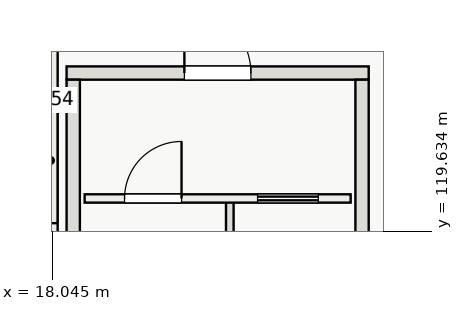
"""IFC4 building model, lengths in metres.
Left out: names, types, materials, properties, quantities, classifications, styles, units other than length and angle.
Written with IfcOpenShell. Run it as: python <this file> out.ifc"""

import sys

from ifc_helpers import new_model, si_unit, direction, frame, frame_2d, origin, place, context, subcontext, project, spatial, rectangle, extrude, element, fill, save


model = new_model("IFC4")
c1 = context("Model", 3, precision=1e-05, world=origin(), true_north=direction((0.0, 1.0)))
c2 = subcontext(c1, "Body", "Model", "MODEL_VIEW")
j1 = project(units=[si_unit("LENGTHUNIT", "METRE"), si_unit("PLANEANGLEUNIT", "RADIAN")], contexts=[c1])
p1 = place(None, origin())
s1 = spatial("IfcSite", under=j1, at=p1, CompositionType="ELEMENT")
p2 = place(p1, origin())
s2 = spatial("IfcBuilding", under=s1, at=p2, CompositionType="ELEMENT")
p3 = place(p2, origin())
s3 = spatial("IfcBuildingStorey", under=s2, at=p3, CompositionType="ELEMENT", Elevation=0.0)
p4 = place(p3, frame((18.425, 123.8, 0.0), z_axis=(0.0, 0.0, 1.0), x_axis=(1.0, 0.0, 0.0)))
e1 = element("IfcWall", 1, at=p4, inside=s3, PredefinedType="SHEAR", context=c2, shape_type="SweptSolid", body=[
    extrude(rectangle(XDim=7.95, YDim=0.35, at=frame_2d((3.975, 0.0))), origin(), (0.0, 0.0, 1.0), 6.0),
])
p5 = place(p4, frame((3.1, 0.0, 0.0)))
e2 = element("IfcOpeningElement", 2, at=p5, cuts=e1, PredefinedType="OPENING", context=c2, shape_type="SweptSolid", body=[
    extrude(rectangle(XDim=1.75, YDim=2.3, at=frame_2d((0.875, 1.15))), frame((0.0, 0.185, 0.0), z_axis=(0.0, -1.0, 0.0), x_axis=(1.0, 0.0, 0.0)), (0.0, 0.0, 1.0), 0.37),
])
for number, where, z_axis, x_axis in (
    (3, (18.6, 112.375, 0.0), (0.0, 0.0, 1.0), (0.0, 1.0, 0.0)),
    (4, (26.2, 112.375, 0.0), (0.0, 0.0, 1.0), (0.0, 1.0, 0.0)),
):
    element("IfcWall", number, at=place(p3, frame(where, z_axis=z_axis, x_axis=x_axis)), inside=s3, PredefinedType="SHEAR", context=c2, shape_type="SweptSolid", body=[
        extrude(rectangle(XDim=11.25, YDim=0.35, at=frame_2d((5.625, 0.0))), origin(), (0.0, 0.0, 1.0), 6.0),
    ])
p6 = place(p3, frame((18.0, 125.551, 0.0), z_axis=(0.0, 0.0, 1.0), x_axis=(0.0, -1.0, 0.0)))
e5 = element("IfcWall", 5, at=p6, inside=s3, PredefinedType="SOLIDWALL", context=c2, shape_type="SweptSolid", body=[
    extrude(rectangle(XDim=8.101, YDim=0.38, at=frame_2d((4.051, 0.0))), origin(), (0.0, 0.0, 1.0), 4.72),
])
p7 = place(p6, frame((2.4, 0.0, 1.0)))
e6 = element("IfcOpeningElement", 6, at=p7, cuts=e5, PredefinedType="OPENING", context=c2, shape_type="SweptSolid", body=[
    extrude(rectangle(XDim=3.3, YDim=1.9, at=frame_2d((1.65, 0.95))), frame((0.0, 0.2, 0.0), z_axis=(0.0, -1.0, 0.0), x_axis=(1.0, 0.0, 0.0)), (0.0, 0.0, 1.0), 0.4),
])
p8 = place(p3, frame((22.72, 112.45, 0.0), z_axis=(0.0, 0.0, 1.0), x_axis=(0.0, 1.0, 0.0)))
e7 = element("IfcWall", 7, at=p8, inside=s3, PredefinedType="SOLIDWALL", context=c2, shape_type="SweptSolid", body=[
    extrude(rectangle(XDim=8.0, YDim=0.2, at=frame_2d((4.0, 0.0))), origin(), (0.0, 0.0, 1.0), 6.0),
])
p9 = place(p3, frame((18.9, 120.5, 0.0), z_axis=(0.0, 0.0, 1.0), x_axis=(1.0, 0.0, 0.0)))
e8 = element("IfcWall", 8, at=p9, inside=s3, PredefinedType="SOLIDWALL", context=c2, shape_type="SweptSolid", body=[
    extrude(rectangle(XDim=7.0, YDim=0.22, at=frame_2d((3.5, 0.0))), origin(), (0.0, 0.0, 1.0), 5.68),
])
p10 = place(p9, frame((1.05, 0.0, 0.0)))
e9 = element("IfcOpeningElement", 9, at=p10, cuts=e8, PredefinedType="OPENING", context=c2, shape_type="SweptSolid", body=[
    extrude(rectangle(XDim=1.5, YDim=2.2, at=frame_2d((0.75, 1.1))), frame((0.0, 0.12, 0.0), z_axis=(0.0, -1.0, 0.0), x_axis=(1.0, 0.0, 0.0)), (0.0, 0.0, 1.0), 0.24),
])
p11 = place(p9, frame((4.55, 0.0, 0.0)))
e10 = element("IfcOpeningElement", 10, at=p11, cuts=e8, PredefinedType="OPENING", context=c2, shape_type="SweptSolid", body=[
    extrude(rectangle(XDim=1.6, YDim=2.3, at=frame_2d((0.8, 1.15))), frame((0.0, 0.12, 0.0), z_axis=(0.0, -1.0, 0.0), x_axis=(1.0, 0.0, 0.0)), (0.0, 0.0, 1.0), 0.24),
])
p12 = place(p10, origin())
e11 = element("IfcDoor", 11, at=p12, inside=s3, OperationType="SINGLE_SWING_RIGHT", PredefinedType="DOOR", context=c2, shape_type="SweptSolid", body=[
    extrude(rectangle(XDim=1.5, YDim=2.2, at=frame_2d((0.75, 1.1))), frame((0.0, 0.025, 0.0), z_axis=(0.0, -1.0, 0.0), x_axis=(1.0, 0.0, 0.0)), (0.0, 0.0, 1.0), 0.05),
])
fill(e9, e11)
p13 = place(p11, origin())
e12 = element("IfcDoor", 12, at=p13, inside=s3, OperationType="SLIDING_TO_RIGHT", PredefinedType="DOOR", context=c2, shape_type="SweptSolid", body=[
    extrude(rectangle(XDim=1.6, YDim=2.3, at=frame_2d((0.8, 1.15))), frame((0.0, 0.025, 0.0), z_axis=(0.0, -1.0, 0.0), x_axis=(1.0, 0.0, 0.0)), (0.0, 0.0, 1.0), 0.05),
])
fill(e10, e12)
p14 = place(p5, origin())
e13 = element("IfcDoor", 13, at=p14, inside=s3, OperationType="DOUBLE_DOOR_SINGLE_SWING", PredefinedType="DOOR", context=c2, shape_type="SweptSolid", body=[
    extrude(rectangle(XDim=1.75, YDim=2.3, at=frame_2d((0.875, 1.15))), frame((0.0, 0.025, 0.0), z_axis=(0.0, -1.0, 0.0), x_axis=(1.0, 0.0, 0.0)), (0.0, 0.0, 1.0), 0.05),
])
fill(e2, e13)
save(model, sys.argv[1])
